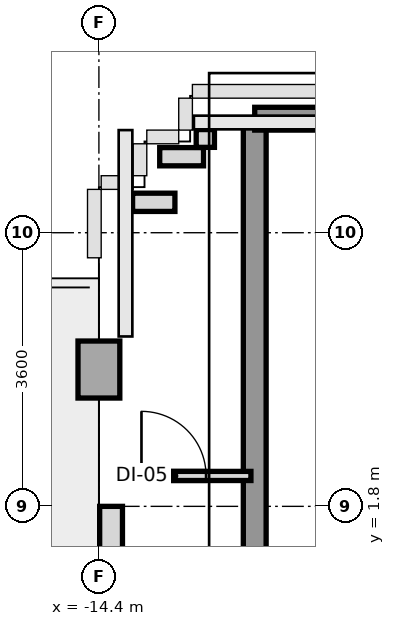
"""IFC4 building model, lengths in metres.
Left out: names, types, materials, properties, quantities, classifications, styles, units other than length and angle.
Written with IfcOpenShell. Run it as: python <this file> out.ifc"""

import sys

from ifc_helpers import new_model, si_unit, direction, frame, frame_2d, origin, origin_2d, place, context, subcontext, project, spatial, rectangle, extrude, source, transform, mapped, element, fill, save


model = new_model("IFC4")
c1 = context("Model", 3, precision=1e-05, world=origin(), true_north=direction((0.0, 1.0)))
c2 = subcontext(c1, "Body", "Model", "MODEL_VIEW")
j1 = project(units=[si_unit("LENGTHUNIT", "METRE"), si_unit("PLANEANGLEUNIT", "RADIAN")], contexts=[c1])
p1 = place(None, origin())
s1 = spatial("IfcSite", under=j1, at=p1, CompositionType="ELEMENT")
p2 = place(p1, origin())
s2 = spatial("IfcBuilding", under=s1, at=p2, CompositionType="ELEMENT")
p3 = place(p2, frame((0.0, 0.0, 258.8)))
s3 = spatial("IfcBuildingStorey", under=s2, at=p3, CompositionType="ELEMENT", Elevation=258.8)
m1 = source(origin(), c2, "Body", "SweptSolid", [
    extrude(rectangle(XDim=0.55, YDim=0.75, at=origin_2d()), origin(), (0.0, 0.0, 1.0), 3.01),
])
p4 = place(p3, frame((-14.4, 3.6, 0.0), z_axis=(0.0, 0.0, 1.0), x_axis=(1.0, 0.0, 0.0)))
e1 = element("IfcColumn", 1, at=p4, inside=s3, PredefinedType="COLUMN", context=c2, shape_type="MappedRepresentation", body=[
    mapped(m1, transform((0.0, 0.0, 0.0), x_axis=(1.0, 0.0, 0.0), y_axis=(0.0, 1.0, 0.0), z_axis=(0.0, 0.0, 1.0), scale=1.0)),
])
p5 = place(p3, frame((-14.24, -1.8, 0.0), z_axis=(0.0, 0.0, 1.0), x_axis=(0.0, 1.0, 0.0)))
e2 = element("IfcWall", 2, at=p5, inside=s3, PredefinedType="SOLIDWALL", context=c2, shape_type="SweptSolid", body=[
    extrude(rectangle(XDim=3.6, YDim=0.3, at=frame_2d((1.8, 0.0))), origin(), (0.0, 0.0, 1.0), 2.36),
])
p6 = place(p5, frame((1.25, 0.0, 0.0)))
e3 = element("IfcOpeningElement", 3, at=p6, cuts=e2, PredefinedType="OPENING", context=c2, shape_type="SweptSolid", body=[
    extrude(rectangle(XDim=1.1, YDim=2.3, at=frame_2d((0.55, 1.15))), frame((0.0, 0.16, 0.0), z_axis=(0.0, -1.0, 0.0), x_axis=(1.0, 0.0, 0.0)), (0.0, 0.0, 1.0), 0.32),
])
p7 = place(p3, frame((-13.957, 5.8, 0.0), z_axis=(0.0, 0.0, 1.0), x_axis=(1.0, 0.0, 0.0)))
e4 = element("IfcWall", 4, at=p7, inside=s3, PredefinedType="PARAPET", context=c2, shape_type="SweptSolid", body=[
    extrude(rectangle(XDim=0.557, YDim=0.24, at=frame_2d((0.279, 0.0))), origin(), (0.0, 0.0, 1.0), 1.15),
])
p8 = place(p3, frame((-13.6, 6.4, 0.0), z_axis=(0.0, 0.0, 1.0), x_axis=(1.0, 0.0, 0.0)))
e5 = element("IfcWall", 5, at=p8, inside=s3, PredefinedType="PARAPET", context=c2, shape_type="SweptSolid", body=[
    extrude(rectangle(XDim=0.576, YDim=0.24, at=frame_2d((0.288, 0.0))), origin(), (0.0, 0.0, 1.0), 1.15),
])
p9 = place(p3, frame((-13.0, 6.523, 0.0), z_axis=(0.0, 0.0, 1.0), x_axis=(0.0, 1.0, 0.0)))
e6 = element("IfcWall", 6, at=p9, inside=s3, PredefinedType="PARAPET", context=c2, shape_type="SweptSolid", body=[
    extrude(rectangle(XDim=0.234, YDim=0.24, at=frame_2d((0.117, 0.0))), origin(), (0.0, 0.0, 1.0), 1.15),
])
p10 = place(p3, frame((-12.35, -5.6, 0.0), z_axis=(0.0, 0.0, 1.0), x_axis=(0.0, 1.0, 0.0)))
e7 = element("IfcWall", 7, at=p10, inside=s3, PredefinedType="SHEAR", context=c2, shape_type="SweptSolid", body=[
    extrude(rectangle(XDim=12.5, YDim=0.3, at=frame_2d((6.25, 0.0))), origin(), (0.0, 0.0, 1.0), 3.01),
])
p11 = place(p3, frame((-12.35, 6.9, 0.0), z_axis=(0.0, 0.0, 1.0), x_axis=(1.0, 0.0, 0.0)))
e8 = element("IfcWall", 8, at=p11, inside=s3, PredefinedType="SHEAR", context=c2, shape_type="SweptSolid", body=[
    extrude(rectangle(XDim=6.95, YDim=0.3, at=frame_2d((3.475, 0.0))), origin(), (0.0, 0.0, 1.0), 3.01),
])
p12 = place(p3, frame((-14.04, 2.2, 0.0), z_axis=(0.0, 0.0, 1.0), x_axis=(1.0, 0.0, 0.0)))
e9 = element("IfcWall", 9, at=p12, inside=s3, PredefinedType="PARTITIONING", context=c2, shape_type="SweptSolid", body=[
    extrude(rectangle(XDim=1.64, YDim=0.12, at=frame_2d((0.82, 0.0))), origin(), (0.0, 0.0, 1.0), 3.01),
])
p13 = place(p12, frame((0.2, 0.0, 0.0)))
e10 = element("IfcOpeningElement", 10, at=p13, cuts=e9, PredefinedType="OPENING", context=c2, shape_type="SweptSolid", body=[
    extrude(rectangle(XDim=0.85, YDim=2.1, at=frame_2d((0.425, 1.05))), frame((0.0, 0.07, 0.0), z_axis=(0.0, -1.0, 0.0), x_axis=(1.0, 0.0, 0.0)), (0.0, 0.0, 1.0), 0.14),
])
m2 = source(origin(), c2, "Body", "SweptSolid", [
    extrude(rectangle(XDim=0.85, YDim=2.1, at=frame_2d((0.425, 1.05))), frame((0.0, 0.025, 0.0), z_axis=(0.0, -1.0, 0.0), x_axis=(1.0, 0.0, 0.0)), (0.0, 0.0, 1.0), 0.05),
])
p14 = place(p13, origin())
e11 = element("IfcDoor", 11, at=p14, inside=s3, OperationType="SINGLE_SWING_LEFT", PredefinedType="DOOR", context=c2, shape_type="MappedRepresentation", body=[
    mapped(m2, transform((0.0, 0.0, 0.0), x_axis=(1.0, 0.0, 0.0), y_axis=(0.0, 1.0, 0.0), z_axis=(0.0, 0.0, 1.0), scale=1.0)),
])
fill(e10, e11)
save(model, sys.argv[1])
